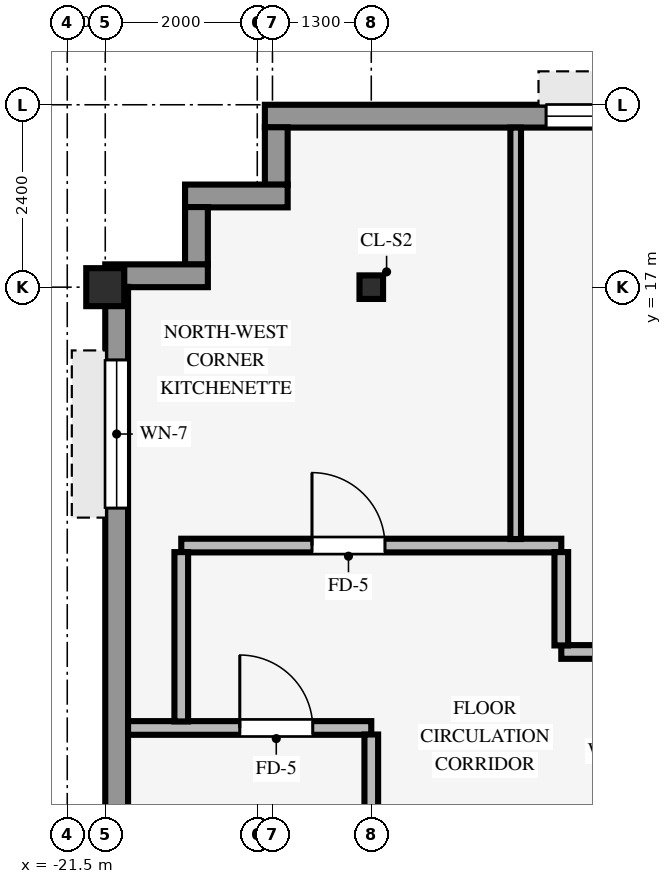
"""IFC4 building model, lengths in metres.
Left out: names, types, materials, properties, quantities, classifications, styles, units other than length and angle.
Written with IfcOpenShell. Run it as: python <this file> out.ifc"""

import sys

from ifc_helpers import new_model, si_unit, direction, frame, frame_2d, origin, origin_2d, place, context, subcontext, project, spatial, rectangle, hollow_rectangle, i_section, extrude, source, transform, mapped, element, fill, save


model = new_model("IFC4")
c1 = context("Model", 3, precision=1e-05, world=origin(), true_north=direction((0.0, 1.0)))
c2 = subcontext(c1, "Body", "Model", "MODEL_VIEW")
j1 = project(units=[si_unit("LENGTHUNIT", "METRE"), si_unit("PLANEANGLEUNIT", "RADIAN")], contexts=[c1])
p1 = place(None, origin())
s1 = spatial("IfcSite", under=j1, at=p1, CompositionType="ELEMENT")
p2 = place(p1, origin())
s2 = spatial("IfcBuilding", under=s1, at=p2, CompositionType="ELEMENT")
p3 = place(p2, frame((0.0, 0.0, 268.9)))
s3 = spatial("IfcBuildingStorey", under=s2, at=p3, CompositionType="ELEMENT", Elevation=268.9)
p4 = place(p3, frame((-21.0, 17.0, 0.0), z_axis=(0.0, 0.0, 1.0), x_axis=(1.0, 0.0, 0.0)))
e1 = element("IfcColumn", 1, at=p4, inside=s3, PredefinedType="COLUMN", context=c2, shape_type="SweptSolid", body=[
    extrude(hollow_rectangle(XDim=0.5, YDim=0.5, WallThickness=0.032, InnerFilletRadius=0.032, OuterFilletRadius=0.064, at=origin_2d()), origin(), (0.0, 0.0, 1.0), 3.37),
])
p5 = place(p3, frame((-17.5, 17.0, 0.0), z_axis=(0.0, 0.0, 1.0), x_axis=(1.0, 0.0, 0.0)))
e2 = element("IfcColumn", 2, at=p5, inside=s3, PredefinedType="COLUMN", context=c2, shape_type="SweptSolid", body=[
    extrude(i_section(OverallWidth=0.31, OverallDepth=0.31, WebThickness=0.015, FlangeThickness=0.015, FilletRadius=0.015, at=origin_2d()), origin(), (0.0, 0.0, 1.0), 3.37),
])
p6 = place(p3, frame((-18.9, 19.25, 0.0), z_axis=(0.0, 0.0, 1.0), x_axis=(1.0, 0.0, 0.0)))
e3 = element("IfcWall", 3, at=p6, inside=s3, PredefinedType="STANDARD", context=c2, shape_type="SweptSolid", body=[
    extrude(rectangle(XDim=35.6, YDim=0.3, at=frame_2d((17.8, 0.0))), origin(), (0.0, 0.0, 1.0), 2.705),
])
p7 = place(p6, frame((13.5, 0.0, 0.0)))
e4 = element("IfcOpeningElement", 4, at=p7, cuts=e3, PredefinedType="OPENING", context=c2, shape_type="SweptSolid", body=[
    extrude(rectangle(XDim=1.05, YDim=2.1, at=frame_2d((0.525, 1.05))), frame((0.0, 0.16, 0.0), z_axis=(0.0, -1.0, 0.0), x_axis=(1.0, 0.0, 0.0)), (0.0, 0.0, 1.0), 0.32),
])
p8 = place(p6, frame((3.7, 0.0, 0.8)))
e5 = element("IfcOpeningElement", 5, at=p8, cuts=e3, PredefinedType="OPENING", context=c2, shape_type="SweptSolid", body=[
    extrude(rectangle(XDim=1.2, YDim=1.48, at=frame_2d((0.6, 0.74))), frame((0.0, 0.16, 0.0), z_axis=(0.0, -1.0, 0.0), x_axis=(1.0, 0.0, 0.0)), (0.0, 0.0, 1.0), 0.32),
])
p9 = place(p6, frame((16.75, 0.0, 0.8)))
e6 = element("IfcOpeningElement", 6, at=p9, cuts=e3, PredefinedType="OPENING", context=c2, shape_type="SweptSolid", body=[
    extrude(rectangle(XDim=1.2, YDim=1.48, at=frame_2d((0.6, 0.74))), frame((0.0, 0.16, 0.0), z_axis=(0.0, -1.0, 0.0), x_axis=(1.0, 0.0, 0.0)), (0.0, 0.0, 1.0), 0.32),
])
p10 = place(p6, frame((22.0, 0.0, 0.8)))
e7 = element("IfcOpeningElement", 7, at=p10, cuts=e3, PredefinedType="OPENING", context=c2, shape_type="SweptSolid", body=[
    extrude(rectangle(XDim=1.2, YDim=1.48, at=frame_2d((0.6, 0.74))), frame((0.0, 0.16, 0.0), z_axis=(0.0, -1.0, 0.0), x_axis=(1.0, 0.0, 0.0)), (0.0, 0.0, 1.0), 0.32),
])
p11 = place(p6, frame((25.9, 0.0, 0.8)))
e8 = element("IfcOpeningElement", 8, at=p11, cuts=e3, PredefinedType="OPENING", context=c2, shape_type="SweptSolid", body=[
    extrude(rectangle(XDim=1.2, YDim=1.48, at=frame_2d((0.6, 0.74))), frame((0.0, 0.16, 0.0), z_axis=(0.0, -1.0, 0.0), x_axis=(1.0, 0.0, 0.0)), (0.0, 0.0, 1.0), 0.32),
])
p12 = place(p6, frame((32.05, 0.0, 0.8)))
e9 = element("IfcOpeningElement", 9, at=p12, cuts=e3, PredefinedType="OPENING", context=c2, shape_type="SweptSolid", body=[
    extrude(rectangle(XDim=1.2, YDim=1.48, at=frame_2d((0.6, 0.74))), frame((0.0, 0.16, 0.0), z_axis=(0.0, -1.0, 0.0), x_axis=(1.0, 0.0, 0.0)), (0.0, 0.0, 1.0), 0.32),
])
p13 = place(p3, frame((-18.75, 18.346, 0.0), z_axis=(0.0, 0.0, 1.0), x_axis=(0.0, 1.0, 0.0)))
e10 = element("IfcWall", 10, at=p13, inside=s3, PredefinedType="STANDARD", context=c2, shape_type="SweptSolid", body=[
    extrude(rectangle(XDim=0.758, YDim=0.3, at=frame_2d((0.379, 0.0))), origin(), (0.0, 0.0, 1.0), 2.892),
])
p14 = place(p3, frame((-19.95, 18.2, 0.0), z_axis=(0.0, 0.0, 1.0), x_axis=(1.0, 0.0, 0.0)))
e11 = element("IfcWall", 11, at=p14, inside=s3, PredefinedType="STANDARD", context=c2, shape_type="SweptSolid", body=[
    extrude(rectangle(XDim=1.35, YDim=0.3, at=frame_2d((0.675, 0.0))), origin(), (0.0, 0.0, 1.0), 2.892),
])
p15 = place(p3, frame((-19.8, 17.296, 0.0), z_axis=(0.0, 0.0, 1.0), x_axis=(0.0, 1.0, 0.0)))
e12 = element("IfcWall", 12, at=p15, inside=s3, PredefinedType="STANDARD", context=c2, shape_type="SweptSolid", body=[
    extrude(rectangle(XDim=0.758, YDim=0.3, at=frame_2d((0.379, 0.0))), origin(), (0.0, 0.0, 1.0), 2.892),
])
p16 = place(p3, frame((-21.0, 17.15, 0.0), z_axis=(0.0, 0.0, 1.0), x_axis=(1.0, 0.0, 0.0)))
e13 = element("IfcWall", 13, at=p16, inside=s3, PredefinedType="STANDARD", context=c2, shape_type="SweptSolid", body=[
    extrude(rectangle(XDim=1.35, YDim=0.3, at=frame_2d((0.675, 0.0))), origin(), (0.0, 0.0, 1.0), 2.892),
])
p17 = place(p3, frame((-20.85, -17.004, 0.0), z_axis=(0.0, 0.0, 1.0), x_axis=(0.0, 1.0, 0.0)))
e14 = element("IfcWall", 14, at=p17, inside=s3, PredefinedType="STANDARD", context=c2, shape_type="SweptSolid", body=[
    extrude(rectangle(XDim=34.008, YDim=0.3, at=frame_2d((17.004, 0.0))), origin(), (0.0, 0.0, 1.0), 2.705),
])
p18 = place(p17, frame((0.961, 0.0, 0.8)))
e15 = element("IfcOpeningElement", 15, at=p18, cuts=e14, PredefinedType="OPENING", context=c2, shape_type="SweptSolid", body=[
    extrude(rectangle(XDim=1.95, YDim=1.48, at=frame_2d((0.975, 0.74))), frame((0.0, 0.16, 0.0), z_axis=(0.0, -1.0, 0.0), x_axis=(1.0, 0.0, 0.0)), (0.0, 0.0, 1.0), 0.32),
])
p19 = place(p17, frame((8.234, 0.0, 0.8)))
e16 = element("IfcOpeningElement", 16, at=p19, cuts=e14, PredefinedType="OPENING", context=c2, shape_type="SweptSolid", body=[
    extrude(rectangle(XDim=1.95, YDim=1.48, at=frame_2d((0.975, 0.74))), frame((0.0, 0.16, 0.0), z_axis=(0.0, -1.0, 0.0), x_axis=(1.0, 0.0, 0.0)), (0.0, 0.0, 1.0), 0.32),
])
p20 = place(p17, frame((11.006, 0.0, 0.8)))
e17 = element("IfcOpeningElement", 17, at=p20, cuts=e14, PredefinedType="OPENING", context=c2, shape_type="SweptSolid", body=[
    extrude(rectangle(XDim=1.95, YDim=1.48, at=frame_2d((0.975, 0.74))), frame((0.0, 0.16, 0.0), z_axis=(0.0, -1.0, 0.0), x_axis=(1.0, 0.0, 0.0)), (0.0, 0.0, 1.0), 0.32),
])
p21 = place(p17, frame((20.602, 0.0, 0.8)))
e18 = element("IfcOpeningElement", 18, at=p21, cuts=e14, PredefinedType="OPENING", context=c2, shape_type="SweptSolid", body=[
    extrude(rectangle(XDim=1.95, YDim=1.48, at=frame_2d((0.975, 0.74))), frame((0.0, 0.16, 0.0), z_axis=(0.0, -1.0, 0.0), x_axis=(1.0, 0.0, 0.0)), (0.0, 0.0, 1.0), 0.32),
])
p22 = place(p17, frame((23.824, 0.0, 0.8)))
e19 = element("IfcOpeningElement", 19, at=p22, cuts=e14, PredefinedType="OPENING", context=c2, shape_type="SweptSolid", body=[
    extrude(rectangle(XDim=1.95, YDim=1.48, at=frame_2d((0.975, 0.74))), frame((0.0, 0.16, 0.0), z_axis=(0.0, -1.0, 0.0), x_axis=(1.0, 0.0, 0.0)), (0.0, 0.0, 1.0), 0.32),
])
p23 = place(p17, frame((31.097, 0.0, 0.8)))
e20 = element("IfcOpeningElement", 20, at=p23, cuts=e14, PredefinedType="OPENING", context=c2, shape_type="SweptSolid", body=[
    extrude(rectangle(XDim=1.95, YDim=1.48, at=frame_2d((0.975, 0.74))), frame((0.0, 0.16, 0.0), z_axis=(0.0, -1.0, 0.0), x_axis=(1.0, 0.0, 0.0)), (0.0, 0.0, 1.0), 0.32),
])
p24 = place(p3, frame((-20.7, 11.2, 0.0), z_axis=(0.0, 0.0, 1.0), x_axis=(1.0, 0.0, 0.0)))
e21 = element("IfcWall", 21, at=p24, inside=s3, PredefinedType="PARTITIONING", context=c2, shape_type="SweptSolid", body=[
    extrude(rectangle(XDim=3.2, YDim=0.18, at=frame_2d((1.6, 0.0))), origin(), (0.0, 0.0, 1.0), 3.36),
])
p25 = place(p24, frame((1.47, 0.0, 0.0)))
e22 = element("IfcOpeningElement", 22, at=p25, cuts=e21, PredefinedType="OPENING", context=c2, shape_type="SweptSolid", body=[
    extrude(rectangle(XDim=0.96, YDim=2.1, at=frame_2d((0.48, 1.05))), frame((0.0, 0.1, 0.0), z_axis=(0.0, -1.0, 0.0), x_axis=(1.0, 0.0, 0.0)), (0.0, 0.0, 1.0), 0.2),
])
p26 = place(p3, frame((-15.0, 12.2, 0.0), z_axis=(0.0, 0.0, 1.0), x_axis=(1.0, 0.0, 0.0)))
e23 = element("IfcWall", 23, at=p26, inside=s3, PredefinedType="PARTITIONING", context=c2, shape_type="SweptSolid", body=[
    extrude(rectangle(XDim=30.8, YDim=0.18, at=frame_2d((15.4, 0.0))), origin(), (0.0, 0.0, 1.0), 3.36),
])
p27 = place(p26, frame((1.42, 0.0, 0.0)))
e24 = element("IfcOpeningElement", 24, at=p27, cuts=e23, PredefinedType="OPENING", context=c2, shape_type="SweptSolid", body=[
    extrude(rectangle(XDim=0.96, YDim=2.1, at=frame_2d((0.48, 1.05))), frame((0.0, 0.1, 0.0), z_axis=(0.0, -1.0, 0.0), x_axis=(1.0, 0.0, 0.0)), (0.0, 0.0, 1.0), 0.2),
])
p28 = place(p26, frame((25.42, 0.0, 0.0)))
e25 = element("IfcOpeningElement", 25, at=p28, cuts=e23, PredefinedType="OPENING", context=c2, shape_type="SweptSolid", body=[
    extrude(rectangle(XDim=0.96, YDim=2.1, at=frame_2d((0.48, 1.05))), frame((0.0, 0.1, 0.0), z_axis=(0.0, -1.0, 0.0), x_axis=(1.0, 0.0, 0.0)), (0.0, 0.0, 1.0), 0.2),
])
p29 = place(p26, frame((19.22, 0.0, 0.0)))
e26 = element("IfcOpeningElement", 26, at=p29, cuts=e23, PredefinedType="OPENING", context=c2, shape_type="SweptSolid", body=[
    extrude(rectangle(XDim=0.96, YDim=2.1, at=frame_2d((0.48, 1.05))), frame((0.0, 0.1, 0.0), z_axis=(0.0, -1.0, 0.0), x_axis=(1.0, 0.0, 0.0)), (0.0, 0.0, 1.0), 0.2),
])
p30 = place(p26, frame((28.82, 0.0, 0.0)))
e27 = element("IfcOpeningElement", 27, at=p30, cuts=e23, PredefinedType="OPENING", context=c2, shape_type="SweptSolid", body=[
    extrude(rectangle(XDim=0.96, YDim=2.1, at=frame_2d((0.48, 1.05))), frame((0.0, 0.1, 0.0), z_axis=(0.0, -1.0, 0.0), x_axis=(1.0, 0.0, 0.0)), (0.0, 0.0, 1.0), 0.2),
])
p31 = place(p26, frame((9.35, 0.0, 0.0)))
e28 = element("IfcOpeningElement", 28, at=p31, cuts=e23, PredefinedType="OPENING", context=c2, shape_type="SweptSolid", body=[
    extrude(rectangle(XDim=0.9, YDim=2.1, at=frame_2d((0.45, 1.05))), frame((0.0, 0.1, 0.0), z_axis=(0.0, -1.0, 0.0), x_axis=(1.0, 0.0, 0.0)), (0.0, 0.0, 1.0), 0.2),
])
p32 = place(p26, frame((12.15, 0.0, 0.0)))
e29 = element("IfcOpeningElement", 29, at=p32, cuts=e23, PredefinedType="OPENING", context=c2, shape_type="SweptSolid", body=[
    extrude(rectangle(XDim=0.9, YDim=2.1, at=frame_2d((0.45, 1.05))), frame((0.0, 0.1, 0.0), z_axis=(0.0, -1.0, 0.0), x_axis=(1.0, 0.0, 0.0)), (0.0, 0.0, 1.0), 0.2),
])
p33 = place(p26, frame((6.72, 0.0, 0.0)))
e30 = element("IfcOpeningElement", 30, at=p33, cuts=e23, PredefinedType="OPENING", context=c2, shape_type="SweptSolid", body=[
    extrude(rectangle(XDim=0.96, YDim=2.1, at=frame_2d((0.48, 1.05))), frame((0.0, 0.1, 0.0), z_axis=(0.0, -1.0, 0.0), x_axis=(1.0, 0.0, 0.0)), (0.0, 0.0, 1.0), 0.2),
])
p34 = place(p26, frame((16.25, 0.0, 0.0)))
e31 = element("IfcOpeningElement", 31, at=p34, cuts=e23, PredefinedType="OPENING", context=c2, shape_type="SweptSolid", body=[
    extrude(rectangle(XDim=0.9, YDim=2.1, at=frame_2d((0.45, 1.05))), frame((0.0, 0.1, 0.0), z_axis=(0.0, -1.0, 0.0), x_axis=(1.0, 0.0, 0.0)), (0.0, 0.0, 1.0), 0.2),
])
p35 = place(p3, frame((-20.0, 13.6, 0.0), z_axis=(0.0, 0.0, 1.0), x_axis=(1.0, 0.0, 0.0)))
e32 = element("IfcWall", 32, at=p35, inside=s3, PredefinedType="PARTITIONING", context=c2, shape_type="SweptSolid", body=[
    extrude(rectangle(XDim=5.0, YDim=0.18, at=frame_2d((2.5, 0.0))), origin(), (0.0, 0.0, 1.0), 3.038),
])
p36 = place(p35, frame((1.72, 0.0, 0.0)))
e33 = element("IfcOpeningElement", 33, at=p36, cuts=e32, PredefinedType="OPENING", context=c2, shape_type="SweptSolid", body=[
    extrude(rectangle(XDim=0.96, YDim=2.1, at=frame_2d((0.48, 1.05))), frame((0.0, 0.1, 0.0), z_axis=(0.0, -1.0, 0.0), x_axis=(1.0, 0.0, 0.0)), (0.0, 0.0, 1.0), 0.2),
])
p37 = place(p3, frame((-20.0, 11.286, 0.0), z_axis=(0.0, 0.0, 1.0), x_axis=(0.0, 1.0, 0.0)))
e34 = element("IfcWall", 34, at=p37, inside=s3, PredefinedType="PARTITIONING", context=c2, shape_type="SweptSolid", body=[
    extrude(rectangle(XDim=2.228, YDim=0.18, at=frame_2d((1.114, 0.0))), origin(), (0.0, 0.0, 1.0), 3.36),
])
p38 = place(p3, frame((-17.5, 9.996, 0.0), z_axis=(0.0, 0.0, 1.0), x_axis=(0.0, 1.0, 0.0)))
e35 = element("IfcWall", 35, at=p38, inside=s3, PredefinedType="PARTITIONING", context=c2, shape_type="SweptSolid", body=[
    extrude(rectangle(XDim=1.118, YDim=0.18, at=frame_2d((0.559, 0.0))), origin(), (0.0, 0.0, 1.0), 2.892),
])
p39 = place(p3, frame((-15.6, 13.686, 0.0), z_axis=(0.0, 0.0, 1.0), x_axis=(0.0, 1.0, 0.0)))
e36 = element("IfcWall", 36, at=p39, inside=s3, PredefinedType="PARTITIONING", context=c2, shape_type="SweptSolid", body=[
    extrude(rectangle(XDim=5.414, YDim=0.14, at=frame_2d((2.707, 0.0))), origin(), (0.0, 0.0, 1.0), 3.36),
])
p40 = place(p3, frame((-15.0, 12.286, 0.0), z_axis=(0.0, 0.0, 1.0), x_axis=(0.0, 1.0, 0.0)))
e37 = element("IfcWall", 37, at=p40, inside=s3, PredefinedType="PARTITIONING", context=c2, shape_type="SweptSolid", body=[
    extrude(rectangle(XDim=1.228, YDim=0.18, at=frame_2d((0.614, 0.0))), origin(), (0.0, 0.0, 1.0), 3.36),
])
m1 = source(origin(), c2, "Body", "SweptSolid", [
    extrude(rectangle(XDim=1.2, YDim=1.48, at=frame_2d((0.6, 0.74))), frame((0.0, 0.03, 0.0), z_axis=(0.0, -1.0, 0.0), x_axis=(1.0, 0.0, 0.0)), (0.0, 0.0, 1.0), 0.06),
])
p41 = place(p8, origin())
e38 = element("IfcWindow", 38, at=p41, inside=s3, PartitioningType="SINGLE_PANEL", PredefinedType="WINDOW", context=c2, shape_type="MappedRepresentation", body=[
    mapped(m1, transform((0.0, 0.0, 0.0), scale=1.0)),
])
fill(e5, e38)
m2 = source(origin(), c2, "Body", "SweptSolid", [
    extrude(rectangle(XDim=1.95, YDim=1.48, at=frame_2d((0.975, 0.74))), frame((0.0, 0.03, 0.0), z_axis=(0.0, -1.0, 0.0), x_axis=(1.0, 0.0, 0.0)), (0.0, 0.0, 1.0), 0.06),
])
p42 = place(p23, origin())
e39 = element("IfcWindow", 39, at=p42, inside=s3, PartitioningType="SINGLE_PANEL", PredefinedType="WINDOW", context=c2, shape_type="MappedRepresentation", body=[
    mapped(m2, transform((0.0, 0.0, 0.0), scale=1.0)),
])
fill(e20, e39)
m3 = source(origin(), c2, "Body", "SweptSolid", [
    extrude(rectangle(XDim=0.96, YDim=2.1, at=frame_2d((0.48, 1.05))), frame((0.0, 0.025, 0.0), z_axis=(0.0, -1.0, 0.0), x_axis=(1.0, 0.0, 0.0)), (0.0, 0.0, 1.0), 0.05),
])
p43 = place(p36, origin())
e40 = element("IfcDoor", 40, at=p43, inside=s3, OperationType="SINGLE_SWING_LEFT", PredefinedType="DOOR", context=c2, shape_type="MappedRepresentation", body=[
    mapped(m3, transform((0.0, 0.0, 0.0), scale=1.0)),
])
fill(e33, e40)
p44 = place(p25, origin())
e41 = element("IfcDoor", 41, at=p44, inside=s3, OperationType="SINGLE_SWING_LEFT", PredefinedType="DOOR", context=c2, shape_type="MappedRepresentation", body=[
    mapped(m3, transform((0.0, 0.0, 0.0), scale=1.0)),
])
fill(e22, e41)
save(model, sys.argv[1])
